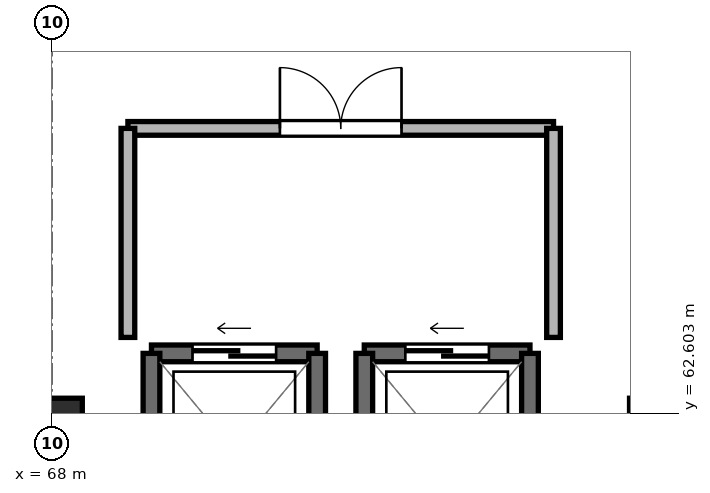
"""IFC4 building model, lengths in metres.
Left out: names, types, materials, properties, quantities, classifications, styles, units other than length and angle.
Written with IfcOpenShell. Run it as: python <this file> out.ifc"""

import sys

from ifc_helpers import new_model, si_unit, direction, frame, frame_2d, origin, origin_2d, place, context, subcontext, project, spatial, rectangle, extrude, element, fill, save


model = new_model("IFC4")
c1 = context("Model", 3, precision=1e-05, world=origin(), true_north=direction((0.0, 1.0)))
c2 = subcontext(c1, "Body", "Model", "MODEL_VIEW")
j1 = project(units=[si_unit("LENGTHUNIT", "METRE"), si_unit("PLANEANGLEUNIT", "RADIAN")], contexts=[c1])
p1 = place(None, origin())
s1 = spatial("IfcSite", under=j1, at=p1, CompositionType="ELEMENT")
p2 = place(p1, origin())
s2 = spatial("IfcBuilding", under=s1, at=p2, CompositionType="ELEMENT")
p3 = place(p2, frame((0.0, 0.0, 47.05)))
s3 = spatial("IfcBuildingStorey", under=s2, at=p3, CompositionType="ELEMENT", Elevation=47.05)
for number, where, z_axis, x_axis in (
    (1, (68.0, 62.4, -0.23), (0.0, 0.0, 1.0), (1.0, 0.0, 0.0)),
    (2, (76.0, 62.4, -0.23), (0.0, 0.0, 1.0), (1.0, 0.0, 0.0)),
):
    element("IfcColumn", number, at=place(p3, frame(where, z_axis=z_axis, x_axis=x_axis)), inside=s3, PredefinedType="COLUMN", context=c2, shape_type="SweptSolid", body=[
        extrude(rectangle(XDim=0.8, YDim=0.8, at=origin_2d()), origin(), (0.0, 0.0, 1.0), 3.25),
    ])
p4 = place(p3, frame((71.49, 63.39, 0.0), z_axis=(0.0, 0.0, 1.0), x_axis=(-1.0, 0.0, 0.0)))
e3 = element("IfcWall", 3, at=p4, inside=s3, PredefinedType="SHEAR", context=c2, shape_type="SweptSolid", body=[
    extrude(rectangle(XDim=2.18, YDim=0.22, at=frame_2d((1.09, 0.0))), origin(), (0.0, 0.0, 1.0), 3.02),
])
p5 = place(p4, frame((0.54, 0.0, 0.0)))
e4 = element("IfcOpeningElement", 4, at=p5, cuts=e3, PredefinedType="OPENING", context=c2, shape_type="SweptSolid", body=[
    extrude(rectangle(XDim=1.1, YDim=2.2, at=frame_2d((0.55, 1.1))), frame((0.0, 0.122, 0.0), z_axis=(0.0, -1.0, 0.0), x_axis=(1.0, 0.0, 0.0)), (0.0, 0.0, 1.0), 0.244),
])
for number, where, z_axis, x_axis in (
    (5, (69.31, 63.39, 0.0), (0.0, 0.0, 1.0), (0.0, -1.0, 0.0)),
    (6, (71.49, 60.81, 0.0), (0.0, 0.0, 1.0), (0.0, 1.0, 0.0)),
):
    element("IfcWall", number, at=place(p3, frame(where, z_axis=z_axis, x_axis=x_axis)), inside=s3, PredefinedType="SHEAR", context=c2, shape_type="SweptSolid", body=[
        extrude(rectangle(XDim=2.58, YDim=0.22, at=frame_2d((1.29, 0.0))), origin(), (0.0, 0.0, 1.0), 3.02),
    ])
p6 = place(p3, frame((74.29, 63.39, 0.0), z_axis=(0.0, 0.0, 1.0), x_axis=(-1.0, 0.0, 0.0)))
e7 = element("IfcWall", 7, at=p6, inside=s3, PredefinedType="SHEAR", context=c2, shape_type="SweptSolid", body=[
    extrude(rectangle(XDim=2.18, YDim=0.22, at=frame_2d((1.09, 0.0))), origin(), (0.0, 0.0, 1.0), 3.02),
])
p7 = place(p6, frame((0.54, 0.0, 0.0)))
e8 = element("IfcOpeningElement", 8, at=p7, cuts=e7, PredefinedType="OPENING", context=c2, shape_type="SweptSolid", body=[
    extrude(rectangle(XDim=1.1, YDim=2.2, at=frame_2d((0.55, 1.1))), frame((0.0, 0.122, 0.0), z_axis=(0.0, -1.0, 0.0), x_axis=(1.0, 0.0, 0.0)), (0.0, 0.0, 1.0), 0.244),
])
for number, where, z_axis, x_axis in (
    (9, (72.11, 63.39, 0.0), (0.0, 0.0, 1.0), (0.0, -1.0, 0.0)),
    (10, (74.29, 60.81, 0.0), (0.0, 0.0, 1.0), (0.0, 1.0, 0.0)),
):
    element("IfcWall", number, at=place(p3, frame(where, z_axis=z_axis, x_axis=x_axis)), inside=s3, PredefinedType="SHEAR", context=c2, shape_type="SweptSolid", body=[
        extrude(rectangle(XDim=2.58, YDim=0.22, at=frame_2d((1.29, 0.0))), origin(), (0.0, 0.0, 1.0), 3.02),
    ])
p8 = place(p3, frame((69.0, 66.35, 0.0), z_axis=(0.0, 0.0, 1.0), x_axis=(1.0, 0.0, 0.0)))
e11 = element("IfcWall", 11, at=p8, inside=s3, PredefinedType="PARTITIONING", context=c2, shape_type="SweptSolid", body=[
    extrude(rectangle(XDim=5.6, YDim=0.18, at=frame_2d((2.8, 0.0))), origin(), (0.0, 0.0, 1.0), 2.53),
])
p9 = place(p8, frame((2.0, 0.0, 0.0)))
e12 = element("IfcOpeningElement", 12, at=p9, cuts=e11, PredefinedType="OPENING", context=c2, shape_type="SweptSolid", body=[
    extrude(rectangle(XDim=1.6, YDim=2.2, at=frame_2d((0.8, 1.1))), frame((0.0, 0.102, 0.0), z_axis=(0.0, -1.0, 0.0), x_axis=(1.0, 0.0, 0.0)), (0.0, 0.0, 1.0), 0.204),
])
for number, where, z_axis, x_axis in (
    (13, (69.0, 63.6, 0.0), (0.0, 0.0, 1.0), (0.0, 1.0, 0.0)),
    (14, (74.6, 63.6, 0.0), (0.0, 0.0, 1.0), (0.0, 1.0, 0.0)),
):
    element("IfcWall", number, at=place(p3, frame(where, z_axis=z_axis, x_axis=x_axis)), inside=s3, PredefinedType="PARTITIONING", context=c2, shape_type="SweptSolid", body=[
        extrude(rectangle(XDim=2.75, YDim=0.18, at=frame_2d((1.375, 0.0))), origin(), (0.0, 0.0, 1.0), 2.53),
    ])
p10 = place(p5, origin())
e15 = element("IfcDoor", 15, at=p10, inside=s3, OperationType="SLIDING_TO_RIGHT", PredefinedType="DOOR", context=c2, shape_type="SweptSolid", body=[
    extrude(rectangle(XDim=1.1, YDim=2.2, at=frame_2d((0.55, 1.1))), frame((0.0, 0.025, 0.0), z_axis=(0.0, -1.0, 0.0), x_axis=(1.0, 0.0, 0.0)), (0.0, 0.0, 1.0), 0.05),
])
fill(e4, e15)
p11 = place(p7, origin())
e16 = element("IfcDoor", 16, at=p11, inside=s3, OperationType="SLIDING_TO_RIGHT", PredefinedType="DOOR", context=c2, shape_type="SweptSolid", body=[
    extrude(rectangle(XDim=1.1, YDim=2.2, at=frame_2d((0.55, 1.1))), frame((0.0, 0.025, 0.0), z_axis=(0.0, -1.0, 0.0), x_axis=(1.0, 0.0, 0.0)), (0.0, 0.0, 1.0), 0.05),
])
fill(e8, e16)
p12 = place(p9, origin())
e17 = element("IfcDoor", 17, at=p12, inside=s3, OperationType="DOUBLE_DOOR_SINGLE_SWING", PredefinedType="DOOR", context=c2, shape_type="SweptSolid", body=[
    extrude(rectangle(XDim=1.6, YDim=2.2, at=frame_2d((0.8, 1.1))), frame((0.0, 0.025, 0.0), z_axis=(0.0, -1.0, 0.0), x_axis=(1.0, 0.0, 0.0)), (0.0, 0.0, 1.0), 0.05),
])
fill(e12, e17)
save(model, sys.argv[1])
